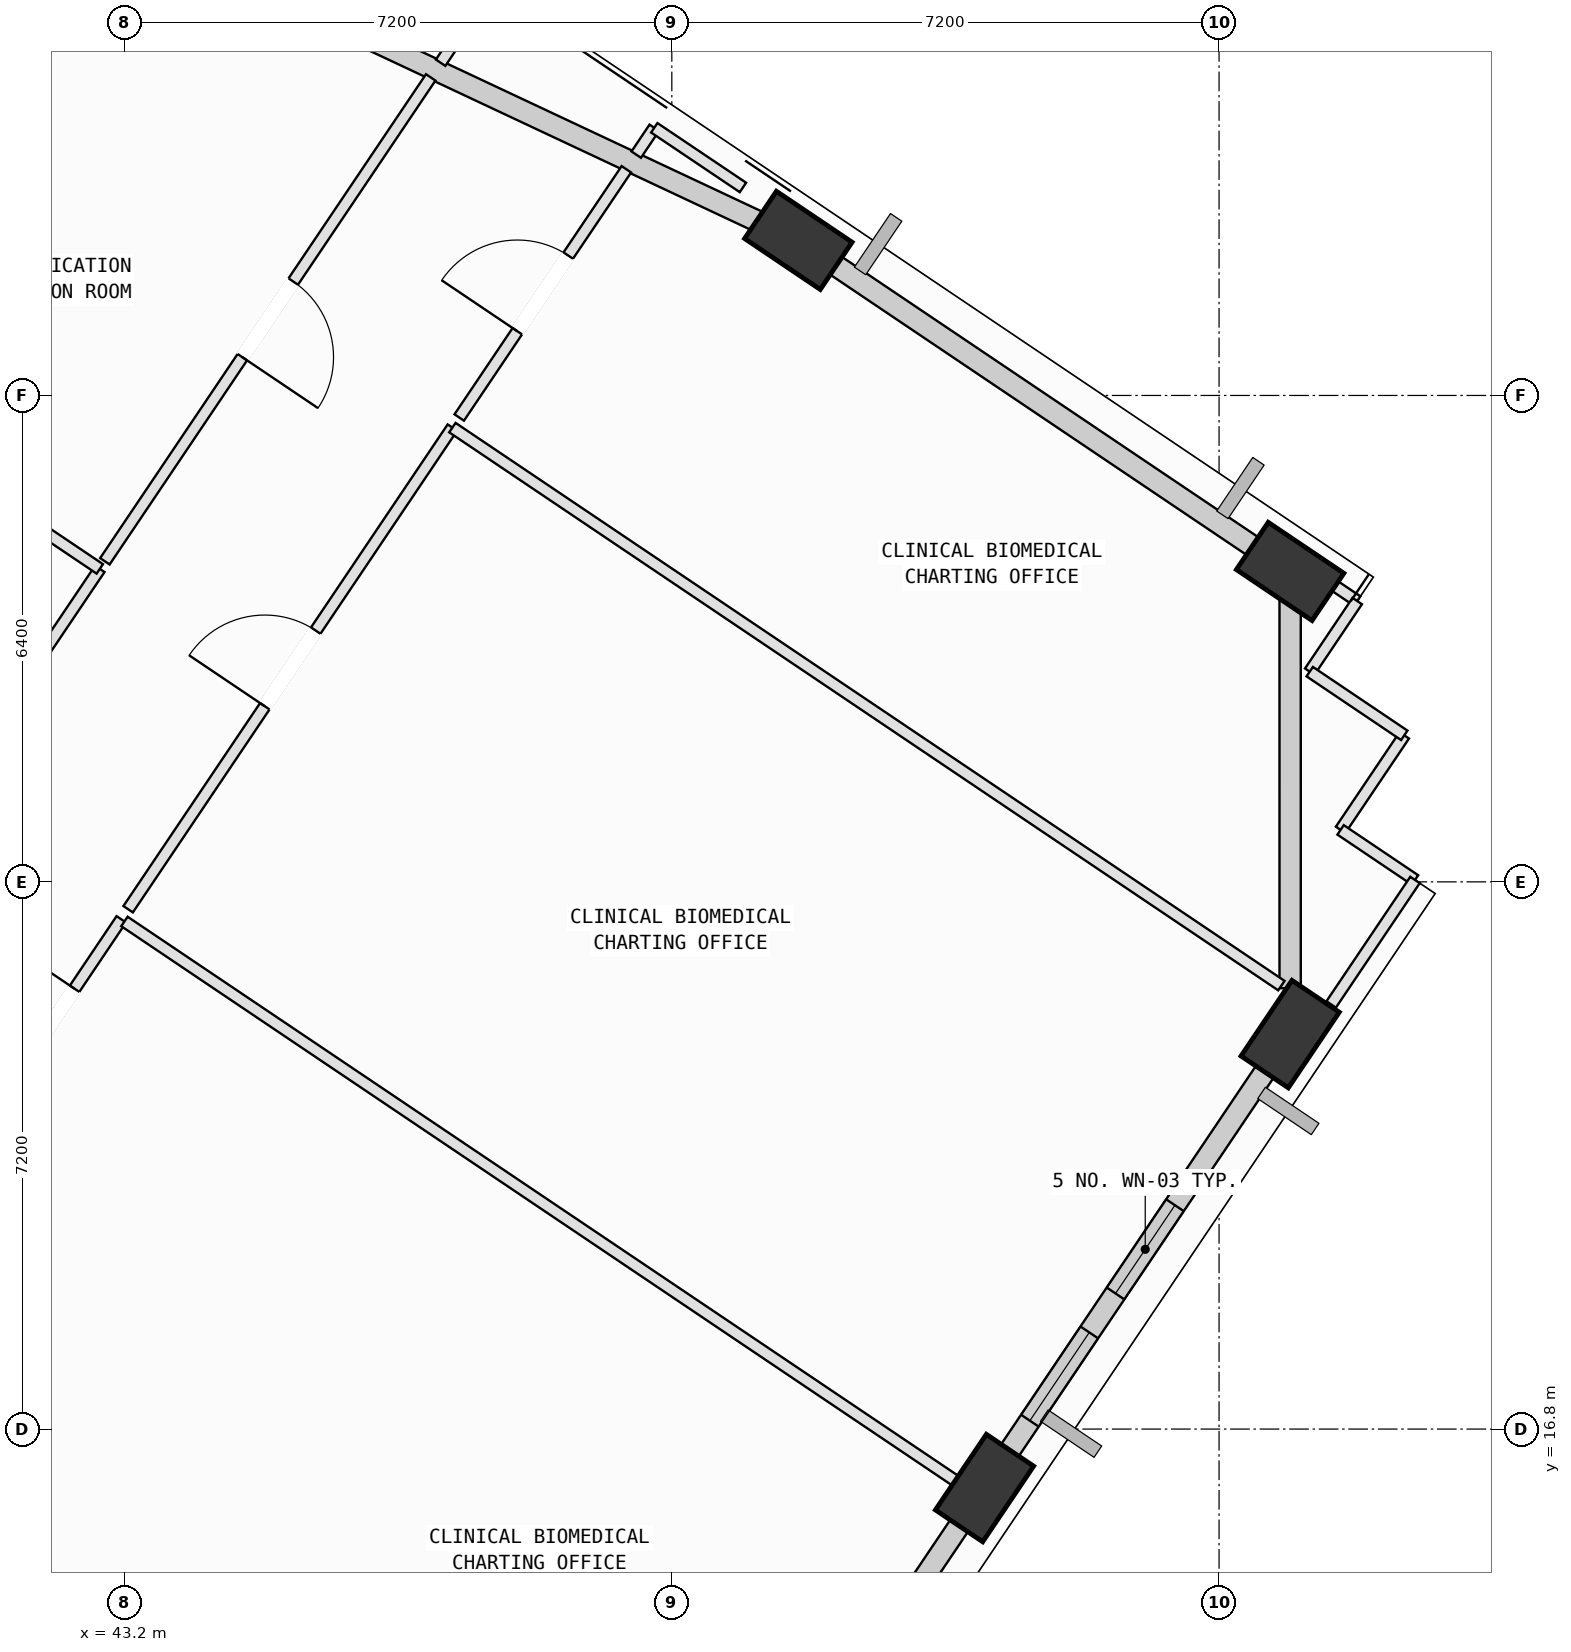
"""IFC4 building model, lengths in metres.
Left out: names, types, materials, properties, quantities, classifications, styles, units other than length and angle.
Written with IfcOpenShell. Run it as: python <this file> out.ifc"""

import sys

from ifc_helpers import new_model, si_unit, direction, frame, frame_2d, origin, origin_2d, place, context, subcontext, project, spatial, rectangle, extrude, element, fill, save


model = new_model("IFC4")
c1 = context("Model", 3, precision=1e-05, world=origin(), true_north=direction((0.0, 1.0)))
c2 = subcontext(c1, "Body", "Model", "MODEL_VIEW")
j1 = project(units=[si_unit("LENGTHUNIT", "METRE"), si_unit("PLANEANGLEUNIT", "RADIAN")], contexts=[c1])
p1 = place(None, origin())
s1 = spatial("IfcSite", under=j1, at=p1, CompositionType="ELEMENT")
p2 = place(p1, origin())
s2 = spatial("IfcBuilding", under=s1, at=p2, CompositionType="ELEMENT")
p3 = place(p2, frame((0.0, 0.0, 263.2)))
s3 = spatial("IfcBuildingStorey", under=s2, at=p3, CompositionType="ELEMENT", Elevation=263.2)
p4 = place(p3, frame((54.514, 16.024, 0.002), z_axis=(0.035506690498, 0.086601684142, 0.9956100759), x_axis=(-0.830026397093, -0.552293328745, 0.077641864689)))
e1 = element("IfcColumn", 1, at=p4, inside=s3, PredefinedType="COLUMN", context=c2, shape_type="SweptSolid", body=[
    extrude(rectangle(XDim=1.2, YDim=0.75, at=origin_2d()), origin(), (0.0, 0.0, 1.0), 3.947),
])
p5 = place(p3, frame((58.535, 21.997, 0.002), z_axis=(0.010710308119, 0.102893249099, 0.994634741294), x_axis=(-0.640889762173, -0.76282129069, 0.085813700609)))
e2 = element("IfcColumn", 2, at=p5, inside=s3, PredefinedType="COLUMN", context=c2, shape_type="SweptSolid", body=[
    extrude(rectangle(XDim=1.2, YDim=0.75, at=origin_2d()), origin(), (0.0, 0.0, 1.0), 3.944),
])
p6 = place(p3, frame((58.535, 28.085, 0.002), z_axis=(-0.014401229556, 0.102662842461, 0.99461195718), x_axis=(0.898644972852, -0.43483943796, 0.057895388089)))
e3 = element("IfcColumn", 3, at=p6, inside=s3, PredefinedType="COLUMN", context=c2, shape_type="SweptSolid", body=[
    extrude(rectangle(XDim=1.2, YDim=0.75, at=origin_2d()), origin(), (0.0, 0.0, 1.0), 3.95),
])
p7 = place(p3, frame((52.065, 32.441, 0.002), z_axis=(-0.032217562712, 0.076038385557, 0.996584262657), x_axis=(0.980924375863, -0.18883949173, 0.04611957503)))
e4 = element("IfcColumn", 4, at=p7, inside=s3, PredefinedType="COLUMN", context=c2, shape_type="SweptSolid", body=[
    extrude(rectangle(XDim=1.2, YDim=0.75, at=origin_2d()), origin(), (0.0, 0.0, 1.0), 3.956),
])
p8 = place(p3, frame((54.396, 15.848, 0.0), z_axis=(0.0, 0.0, 1.0), x_axis=(-0.558449495044, -0.829538523208, 0.0)))
e5 = element("IfcWall", 5, at=p8, inside=s3, PredefinedType="SOLIDWALL", context=c2, shape_type="SweptSolid", body=[
    extrude(rectangle(XDim=6.407, YDim=0.28, at=frame_2d((3.203, 0.0))), origin(), (0.0, 0.0, 1.0), 3.185),
])
p9 = place(p8, frame((2.204, 0.0, 0.75)))
e6 = element("IfcOpeningElement", 6, at=p9, cuts=e5, PredefinedType="OPENING", context=c2, shape_type="SweptSolid", body=[
    extrude(rectangle(XDim=2.0, YDim=1.95, at=frame_2d((1.0, 0.975))), frame((0.0, 0.15, 0.0), z_axis=(0.0, -1.0, 0.0), x_axis=(1.0, 0.0, 0.0)), (0.0, 0.0, 1.0), 0.3),
])
p10 = place(p3, frame((58.423, 21.829, 0.0), z_axis=(0.0, 0.0, 1.0), x_axis=(-0.558495168745, -0.829507773615, 0.0)))
e7 = element("IfcWall", 7, at=p10, inside=s3, PredefinedType="SOLIDWALL", context=c2, shape_type="SweptSolid", body=[
    extrude(rectangle(XDim=6.418, YDim=0.28, at=frame_2d((3.209, 0.0))), origin(), (0.0, 0.0, 1.0), 3.185),
])
p11 = place(p10, frame((2.512, 0.0, 0.75)))
e8 = element("IfcOpeningElement", 8, at=p11, cuts=e7, PredefinedType="OPENING", context=c2, shape_type="SweptSolid", body=[
    extrude(rectangle(XDim=1.4, YDim=1.85, at=frame_2d((0.7, 0.925))), frame((0.0, 0.15, 0.0), z_axis=(0.0, -1.0, 0.0), x_axis=(1.0, 0.0, 0.0)), (0.0, 0.0, 1.0), 0.3),
])
p12 = place(p10, frame((4.53, 0.0, 0.75)))
e9 = element("IfcOpeningElement", 9, at=p12, cuts=e7, PredefinedType="OPENING", context=c2, shape_type="SweptSolid", body=[
    extrude(rectangle(XDim=1.4, YDim=1.85, at=frame_2d((0.7, 0.925))), frame((0.0, 0.15, 0.0), z_axis=(0.0, -1.0, 0.0), x_axis=(1.0, 0.0, 0.0)), (0.0, 0.0, 1.0), 0.3),
])
p13 = place(p3, frame((58.535, 27.894, 0.0), z_axis=(0.0, 0.0, 1.0), x_axis=(0.0, -1.0, 0.0)))
e10 = element("IfcWall", 10, at=p13, inside=s3, PredefinedType="SOLIDWALL", context=c2, shape_type="SweptSolid", body=[
    extrude(rectangle(XDim=5.294, YDim=0.28, at=frame_2d((2.647, 0.0))), origin(), (0.0, 0.0, 1.0), 3.185),
])
p14 = place(p3, frame((52.271, 32.302, 0.0), z_axis=(0.0, 0.0, 1.0), x_axis=(0.829536508839, -0.558452487239, 0.0)))
e11 = element("IfcWall", 11, at=p14, inside=s3, PredefinedType="SOLIDWALL", context=c2, shape_type="SweptSolid", body=[
    extrude(rectangle(XDim=7.046, YDim=0.28, at=frame_2d((3.523, 0.0))), origin(), (0.0, 0.0, 1.0), 3.185),
])
p15 = place(p3, frame((43.428, 36.497, 0.0), z_axis=(0.0, 0.0, 1.0), x_axis=(0.905122173165, -0.425151563145, 0.0)))
e12 = element("IfcWall", 12, at=p15, inside=s3, PredefinedType="SOLIDWALL", context=c2, shape_type="SweptSolid", body=[
    extrude(rectangle(XDim=9.036, YDim=0.28, at=frame_2d((4.518, 0.0))), origin(), (0.0, 0.0, 1.0), 3.185),
])
p16 = place(p3, frame((39.189, 30.685, 0.0), z_axis=(0.0, 0.0, 1.0), x_axis=(0.55845071532, 0.82953770171, 0.0)))
e13 = element("IfcWall", 13, at=p16, inside=s3, PredefinedType="SOLIDWALL", context=c2, shape_type="SweptSolid", body=[
    extrude(rectangle(XDim=6.78, YDim=0.28, at=frame_2d((3.39, 0.0))), origin(), (0.0, 0.0, 1.0), 3.185),
])
p17 = place(p16, frame((2.514, 0.0, 0.75)))
e14 = element("IfcOpeningElement", 14, at=p17, cuts=e13, PredefinedType="OPENING", context=c2, shape_type="SweptSolid", body=[
    extrude(rectangle(XDim=2.0, YDim=1.95, at=frame_2d((1.0, 0.975))), frame((0.0, 0.15, 0.0), z_axis=(0.0, -1.0, 0.0), x_axis=(1.0, 0.0, 0.0)), (0.0, 0.0, 1.0), 0.3),
])
p18 = place(p3, frame((38.801, 17.037, 0.0), z_axis=(0.0, 0.0, 1.0), x_axis=(0.829520972269, -0.558475564878, 0.0)))
e15 = element("IfcWall", 15, at=p18, inside=s3, PredefinedType="PARTITIONING", context=c2, shape_type="SweptSolid", body=[
    extrude(rectangle(XDim=13.485, YDim=0.15, at=frame_2d((6.742, 0.0))), origin(), (0.0, 0.0, 1.0), 3.7),
])
p19 = place(p3, frame((41.258, 20.685, 0.0), z_axis=(0.0, 0.0, 1.0), x_axis=(0.558272819902, 0.829657434462, 0.0)))
e16 = element("IfcWall", 16, at=p19, inside=s3, PredefinedType="PARTITIONING", context=c2, shape_type="SweptSolid", body=[
    extrude(rectangle(XDim=3.401, YDim=0.15, at=frame_2d((1.701, 0.0))), origin(), (0.0, 0.0, 1.0), 3.7),
])
p20 = place(p19, frame((1.101, 0.0, 0.0)))
e17 = element("IfcOpeningElement", 17, at=p20, cuts=e16, PredefinedType="OPENING", context=c2, shape_type="SweptSolid", body=[
    extrude(rectangle(XDim=1.2, YDim=2.15, at=frame_2d((0.6, 1.075))), frame((0.0, 0.085, 0.0), z_axis=(0.0, -1.0, 0.0), x_axis=(1.0, 0.0, 0.0)), (0.0, 0.0, 1.0), 0.17),
])
p21 = place(p3, frame((43.198, 23.479, 0.0), z_axis=(0.0, 0.0, 1.0), x_axis=(0.829581933243, -0.558385006994, 0.0)))
e18 = element("IfcWall", 18, at=p21, inside=s3, PredefinedType="PARTITIONING", context=c2, shape_type="SweptSolid", body=[
    extrude(rectangle(XDim=13.466, YDim=0.15, at=frame_2d((6.733, 0.0))), origin(), (0.0, 0.0, 1.0), 3.7),
])
p22 = place(p3, frame((43.247, 23.64, 0.0), z_axis=(0.0, 0.0, 1.0), x_axis=(0.558419088265, 0.829558992394, 0.0)))
e19 = element("IfcWall", 19, at=p22, inside=s3, PredefinedType="PARTITIONING", context=c2, shape_type="SweptSolid", body=[
    extrude(rectangle(XDim=7.639, YDim=0.15, at=frame_2d((3.82, 0.0))), origin(), (0.0, 0.0, 1.0), 3.7),
])
p23 = place(p22, frame((3.219, 0.0, 0.0)))
e20 = element("IfcOpeningElement", 20, at=p23, cuts=e19, PredefinedType="OPENING", context=c2, shape_type="SweptSolid", body=[
    extrude(rectangle(XDim=1.2, YDim=2.15, at=frame_2d((0.6, 1.075))), frame((0.0, 0.085, 0.0), z_axis=(0.0, -1.0, 0.0), x_axis=(1.0, 0.0, 0.0)), (0.0, 0.0, 1.0), 0.17),
])
p24 = place(p3, frame((47.513, 29.977, 0.0), z_axis=(0.0, 0.0, 1.0), x_axis=(0.829559460975, -0.558418392164, 0.0)))
e21 = element("IfcWall", 21, at=p24, inside=s3, PredefinedType="PARTITIONING", context=c2, shape_type="SweptSolid", body=[
    extrude(rectangle(XDim=13.148, YDim=0.15, at=frame_2d((6.574, 0.0))), origin(), (0.0, 0.0, 1.0), 3.7),
])
p25 = place(p3, frame((58.606, 22.51, 0.0), z_axis=(0.0, 0.0, 1.0), x_axis=(0.829336183231, -0.558749939762, 0.0)))
e22 = element("IfcWall", 22, at=p25, inside=s3, PredefinedType="PARTITIONING", context=c2, shape_type="SweptSolid", body=[
    extrude(rectangle(XDim=0.458, YDim=0.15, at=frame_2d((0.229, 0.0))), origin(), (0.0, 0.0, 1.0), 3.7),
])
p26 = place(p3, frame((58.986, 22.254, 0.0), z_axis=(0.0, 0.0, 1.0), x_axis=(-0.559252824806, -0.828997151953, 0.0)))
e23 = element("IfcWall", 23, at=p26, inside=s3, PredefinedType="PARTITIONING", context=c2, shape_type="SweptSolid", body=[
    extrude(rectangle(XDim=0.667, YDim=0.15, at=frame_2d((0.333, 0.0))), origin(), (0.0, 0.0, 1.0), 3.185),
])
p27 = place(p3, frame((55.029, 16.376, 0.0), z_axis=(0.0, 0.0, 1.0), x_axis=(-0.558958732834, -0.829195474535, 0.0)))
e24 = element("IfcWall", 24, at=p27, inside=s3, PredefinedType="PARTITIONING", context=c2, shape_type="SweptSolid", body=[
    extrude(rectangle(XDim=0.555, YDim=0.15, at=frame_2d((0.277, 0.0))), origin(), (0.0, 0.0, 1.0), 3.185),
])
p28 = place(p3, frame((60.037, 25.928, 0.0), z_axis=(0.0, 0.0, 1.0), x_axis=(-0.558787760044, -0.82931070126, 0.0)))
e25 = element("IfcWall", 25, at=p28, inside=s3, PredefinedType="PARTITIONING", context=c2, shape_type="SweptSolid", body=[
    extrude(rectangle(XDim=1.5, YDim=0.15, at=frame_2d((0.75, 0.0))), origin(), (0.0, 0.0, 1.0), 3.7),
])
p29 = place(p3, frame((59.199, 24.684, 0.0), z_axis=(0.0, 0.0, 1.0), x_axis=(0.829495601094, -0.558513247619, 0.0)))
e26 = element("IfcWall", 26, at=p29, inside=s3, PredefinedType="PARTITIONING", context=c2, shape_type="SweptSolid", body=[
    extrude(rectangle(XDim=1.18, YDim=0.15, at=frame_2d((0.59, 0.0))), origin(), (0.0, 0.0, 1.0), 3.7),
])
p30 = place(p3, frame((60.178, 24.025, 0.0), z_axis=(0.0, 0.0, 1.0), x_axis=(-0.558574341861, -0.82945446205, 0.0)))
e27 = element("IfcWall", 27, at=p30, inside=s3, PredefinedType="PARTITIONING", context=c2, shape_type="SweptSolid", body=[
    extrude(rectangle(XDim=1.975, YDim=0.15, at=frame_2d((0.987, 0.0))), origin(), (0.0, 0.0, 1.0), 3.7),
])
p31 = place(p3, frame((47.603, 30.11, 0.0), z_axis=(0.0, 0.0, 1.0), x_axis=(0.558515056405, 0.829494383205, 0.0)))
e28 = element("IfcWall", 28, at=p31, inside=s3, PredefinedType="PARTITIONING", context=c2, shape_type="SweptSolid", body=[
    extrude(rectangle(XDim=3.937, YDim=0.15, at=frame_2d((1.969, 0.0))), origin(), (0.0, 0.0, 1.0), 3.7),
])
p32 = place(p31, frame((1.369, 0.0, 0.0)))
e29 = element("IfcOpeningElement", 29, at=p32, cuts=e28, PredefinedType="OPENING", context=c2, shape_type="SweptSolid", body=[
    extrude(rectangle(XDim=1.2, YDim=2.15, at=frame_2d((0.6, 1.075))), frame((0.0, 0.085, 0.0), z_axis=(0.0, -1.0, 0.0), x_axis=(1.0, 0.0, 0.0)), (0.0, 0.0, 1.0), 0.17),
])
p33 = place(p3, frame((49.932, 33.569, 0.0), z_axis=(0.0, 0.0, 1.0), x_axis=(0.557479413155, 0.830190763565, 0.0)))
e30 = element("IfcWall", 30, at=p33, inside=s3, PredefinedType="PARTITIONING", context=c2, shape_type="SweptSolid", body=[
    extrude(rectangle(XDim=0.425, YDim=0.15, at=frame_2d((0.213, 0.0))), origin(), (0.0, 0.0, 1.0), 3.7),
])
p34 = place(p3, frame((50.169, 33.922, 0.0), z_axis=(0.0, 0.0, 1.0), x_axis=(0.829692876887, -0.558220144784, 0.0)))
e31 = element("IfcWall", 31, at=p34, inside=s3, PredefinedType="PARTITIONING", context=c2, shape_type="SweptSolid", body=[
    extrude(rectangle(XDim=1.406, YDim=0.15, at=frame_2d((0.703, 0.0))), origin(), (0.0, 0.0, 1.0), 3.185),
])
p35 = place(p3, frame((51.714, 32.882, 0.0), z_axis=(0.0, 0.0, 1.0), x_axis=(0.829460426103, -0.558565485443, 0.0)))
e32 = element("IfcWall", 32, at=p35, inside=s3, PredefinedType="PARTITIONING", context=c2, shape_type="SweptSolid", body=[
    extrude(rectangle(XDim=0.786, YDim=0.15, at=frame_2d((0.393, 0.0))), origin(), (0.0, 0.0, 1.0), 3.185),
])
p36 = place(p3, frame((58.211, 28.508, 0.0), z_axis=(0.0, 0.0, 1.0), x_axis=(0.829408373073, -0.558642775553, 0.0)))
e33 = element("IfcWall", 33, at=p36, inside=s3, PredefinedType="PARTITIONING", context=c2, shape_type="SweptSolid", body=[
    extrude(rectangle(XDim=1.455, YDim=0.15, at=frame_2d((0.728, 0.0))), origin(), (0.0, 0.0, 1.0), 3.185),
])
p37 = place(p3, frame((59.418, 27.695, 0.0), z_axis=(0.0, 0.0, 1.0), x_axis=(-0.558217632546, -0.829694567124, 0.0)))
e34 = element("IfcWall", 34, at=p37, inside=s3, PredefinedType="PARTITIONING", context=c2, shape_type="SweptSolid", body=[
    extrude(rectangle(XDim=1.12, YDim=0.15, at=frame_2d((0.56, 0.0))), origin(), (0.0, 0.0, 1.0), 3.7),
])
p38 = place(p3, frame((58.793, 26.766, 0.0), z_axis=(0.0, 0.0, 1.0), x_axis=(0.829361514738, -0.558712339108, 0.0)))
e35 = element("IfcWall", 35, at=p38, inside=s3, PredefinedType="PARTITIONING", context=c2, shape_type="SweptSolid", body=[
    extrude(rectangle(XDim=1.5, YDim=0.15, at=frame_2d((0.75, 0.0))), origin(), (0.0, 0.0, 1.0), 3.7),
])
p39 = place(p3, frame((42.874, 28.118, 0.0), z_axis=(0.0, 0.0, 1.0), x_axis=(-0.558470489053, -0.829524389549, 0.0)))
e36 = element("IfcWall", 36, at=p39, inside=s3, PredefinedType="PARTITIONING", context=c2, shape_type="SweptSolid", body=[
    extrude(rectangle(XDim=8.788, YDim=0.15, at=frame_2d((4.394, 0.0))), origin(), (0.0, 0.0, 1.0), 3.7),
])
p40 = place(p39, frame((3.794, 0.0, 0.0)))
e37 = element("IfcOpeningElement", 37, at=p40, cuts=e36, PredefinedType="OPENING", context=c2, shape_type="SweptSolid", body=[
    extrude(rectangle(XDim=1.2, YDim=2.15, at=frame_2d((0.6, 1.075))), frame((0.0, 0.085, 0.0), z_axis=(0.0, -1.0, 0.0), x_axis=(1.0, 0.0, 0.0)), (0.0, 0.0, 1.0), 0.17),
])
p41 = place(p3, frame((39.224, 30.575, 0.0), z_axis=(0.0, 0.0, 1.0), x_axis=(0.829549190565, -0.558433649087, 0.0)))
e38 = element("IfcWall", 38, at=p41, inside=s3, PredefinedType="PARTITIONING", context=c2, shape_type="SweptSolid", body=[
    extrude(rectangle(XDim=4.4, YDim=0.15, at=frame_2d((2.2, 0.0))), origin(), (0.0, 0.0, 1.0), 3.7),
])
p42 = place(p3, frame((47.849, 35.508, 0.0), z_axis=(0.0, 0.0, 1.0), x_axis=(-0.558280883345, -0.82965200855, 0.0)))
e39 = element("IfcWall", 39, at=p42, inside=s3, PredefinedType="PARTITIONING", context=c2, shape_type="SweptSolid", body=[
    extrude(rectangle(XDim=0.88, YDim=0.15, at=frame_2d((0.44, 0.0))), origin(), (0.0, 0.0, 1.0), 3.7),
])
p43 = place(p3, frame((47.228, 34.585, 0.0), z_axis=(0.0, 0.0, 1.0), x_axis=(-0.558525800059, -0.829487149188, 0.0)))
e40 = element("IfcWall", 40, at=p43, inside=s3, PredefinedType="PARTITIONING", context=c2, shape_type="SweptSolid", body=[
    extrude(rectangle(XDim=7.676, YDim=0.15, at=frame_2d((3.838, 0.0))), origin(), (0.0, 0.0, 1.0), 3.7),
])
p44 = place(p43, frame((3.238, 0.0, 0.0)))
e41 = element("IfcOpeningElement", 41, at=p44, cuts=e40, PredefinedType="OPENING", context=c2, shape_type="SweptSolid", body=[
    extrude(rectangle(XDim=1.2, YDim=2.15, at=frame_2d((0.6, 1.075))), frame((0.0, 0.085, 0.0), z_axis=(0.0, -1.0, 0.0), x_axis=(1.0, 0.0, 0.0)), (0.0, 0.0, 1.0), 0.17),
])
p45 = place(p3, frame((38.76, 31.033, 0.0), z_axis=(0.0, 0.0, 1.0), x_axis=(0.558554216594, 0.829468014528, 0.0)))
e42 = element("IfcWall", 42, at=p45, inside=s3, PredefinedType="PARTITIONING", context=c2, shape_type="SweptSolid", body=[
    extrude(rectangle(XDim=7.648, YDim=0.15, at=frame_2d((3.824, 0.0))), origin(), (0.0, 0.0, 1.0), 3.185),
])
p46 = place(p11, origin())
e43 = element("IfcWindow", 43, at=p46, inside=s3, PartitioningType="SINGLE_PANEL", PredefinedType="WINDOW", context=c2, shape_type="SweptSolid", body=[
    extrude(rectangle(XDim=1.4, YDim=1.85, at=frame_2d((0.7, 0.925))), frame((0.0, 0.03, 0.0), z_axis=(0.0, -1.0, 0.0), x_axis=(1.0, 0.0, 0.0)), (0.0, 0.0, 1.0), 0.06),
])
fill(e8, e43)
p47 = place(p12, origin())
e44 = element("IfcWindow", 44, at=p47, inside=s3, PartitioningType="SINGLE_PANEL", PredefinedType="WINDOW", context=c2, shape_type="SweptSolid", body=[
    extrude(rectangle(XDim=1.4, YDim=1.85, at=frame_2d((0.7, 0.925))), frame((0.0, 0.03, 0.0), z_axis=(0.0, -1.0, 0.0), x_axis=(1.0, 0.0, 0.0)), (0.0, 0.0, 1.0), 0.06),
])
fill(e9, e44)
p48 = place(p20, origin())
e45 = element("IfcDoor", 45, at=p48, inside=s3, OperationType="SINGLE_SWING_RIGHT", PredefinedType="DOOR", context=c2, shape_type="SweptSolid", body=[
    extrude(rectangle(XDim=1.2, YDim=2.15, at=frame_2d((0.6, 1.075))), frame((0.0, 0.025, 0.0), z_axis=(0.0, -1.0, 0.0), x_axis=(1.0, 0.0, 0.0)), (0.0, 0.0, 1.0), 0.05),
])
fill(e17, e45)
p49 = place(p23, origin())
e46 = element("IfcDoor", 46, at=p49, inside=s3, OperationType="SINGLE_SWING_LEFT", PredefinedType="DOOR", context=c2, shape_type="SweptSolid", body=[
    extrude(rectangle(XDim=1.2, YDim=2.15, at=frame_2d((0.6, 1.075))), frame((0.0, 0.025, 0.0), z_axis=(0.0, -1.0, 0.0), x_axis=(1.0, 0.0, 0.0)), (0.0, 0.0, 1.0), 0.05),
])
fill(e20, e46)
p50 = place(p32, origin())
e47 = element("IfcDoor", 47, at=p50, inside=s3, OperationType="SINGLE_SWING_LEFT", PredefinedType="DOOR", context=c2, shape_type="SweptSolid", body=[
    extrude(rectangle(XDim=1.2, YDim=2.15, at=frame_2d((0.6, 1.075))), frame((0.0, 0.025, 0.0), z_axis=(0.0, -1.0, 0.0), x_axis=(1.0, 0.0, 0.0)), (0.0, 0.0, 1.0), 0.05),
])
fill(e29, e47)
p51 = place(p44, origin())
e48 = element("IfcDoor", 48, at=p51, inside=s3, OperationType="SINGLE_SWING_RIGHT", PredefinedType="DOOR", context=c2, shape_type="SweptSolid", body=[
    extrude(rectangle(XDim=1.2, YDim=2.15, at=frame_2d((0.6, 1.075))), frame((0.0, 0.025, 0.0), z_axis=(0.0, -1.0, 0.0), x_axis=(1.0, 0.0, 0.0)), (0.0, 0.0, 1.0), 0.05),
])
fill(e41, e48)
save(model, sys.argv[1])
